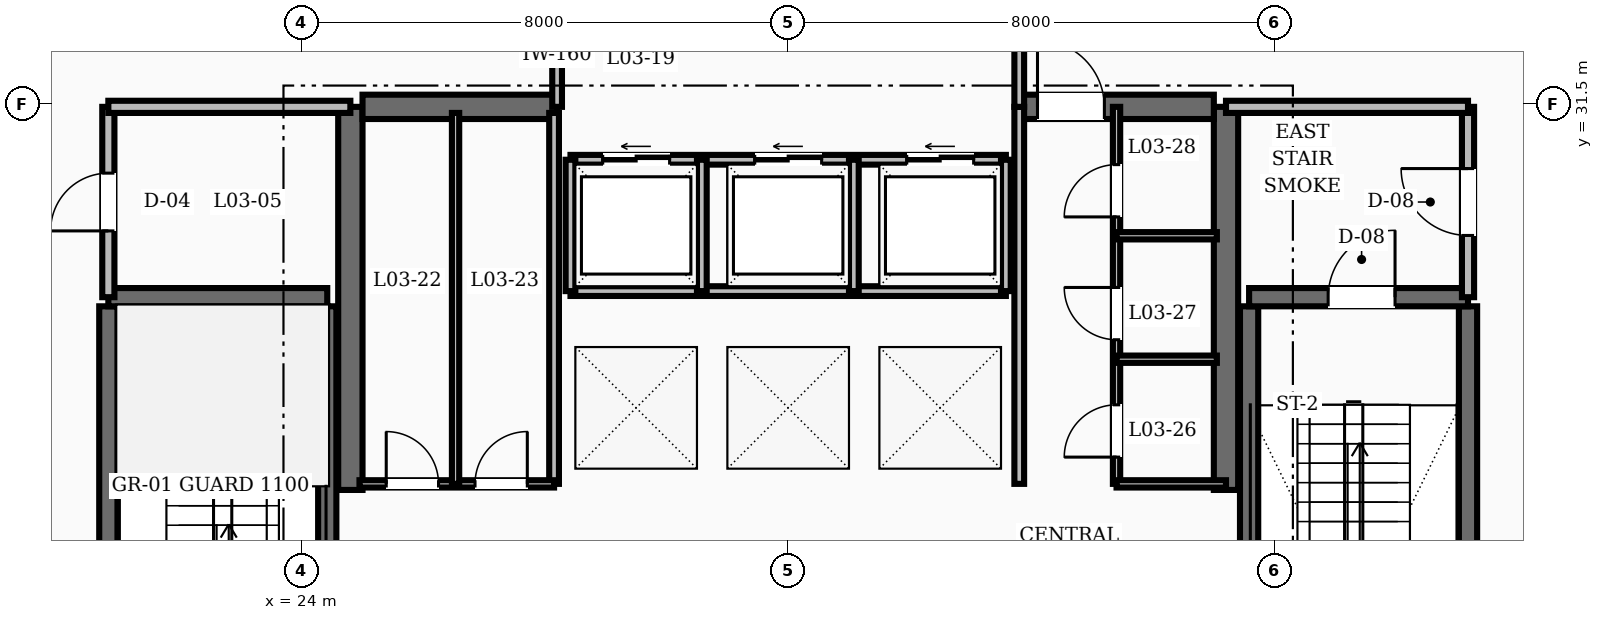
"""IFC4 building model, lengths in metres.
Left out: names, types, materials, properties, quantities, classifications, styles, units other than length and angle.
Written with IfcOpenShell. Run it as: python <this file> out.ifc"""

import sys

from ifc_helpers import new_model, si_unit, direction, frame, frame_2d, origin, place, context, subcontext, project, spatial, rectangle, extrude, element, fill, save


model = new_model("IFC4")
c1 = context("Model", 3, precision=1e-05, world=origin(), true_north=direction((0.0, 1.0)))
c2 = subcontext(c1, "Body", "Model", "MODEL_VIEW")
j1 = project(units=[si_unit("LENGTHUNIT", "METRE"), si_unit("PLANEANGLEUNIT", "RADIAN")], contexts=[c1])
p1 = place(None, origin())
s1 = spatial("IfcSite", under=j1, at=p1, CompositionType="ELEMENT")
p2 = place(p1, origin())
s2 = spatial("IfcBuilding", under=s1, at=p2, CompositionType="ELEMENT")
p3 = place(p2, frame((0.0, 0.0, 14.8)))
s3 = spatial("IfcBuildingStorey", under=s2, at=p3, CompositionType="ELEMENT", Elevation=14.8)
for number, where, z_axis, x_axis in (
    (1, (24.8, 25.15, 0.0), (0.0, 0.0, 1.0), (0.0, 1.0, 0.0)),
    (2, (39.2, 25.15, 0.0), (0.0, 0.0, 1.0), (0.0, 1.0, 0.0)),
):
    element("IfcWall", number, at=place(p3, frame(where, z_axis=z_axis, x_axis=x_axis)), inside=s3, PredefinedType="SHEAR", context=c2, shape_type="SweptSolid", body=[
        extrude(rectangle(XDim=6.3, YDim=0.4, at=frame_2d((3.15, 0.0))), origin(), (0.0, 0.0, 1.0), 4.8),
    ])
p4 = place(p3, frame((25.0, 31.45, 0.0), z_axis=(0.0, 0.0, 1.0), x_axis=(1.0, 0.0, 0.0)))
e3 = element("IfcWall", 3, at=p4, inside=s3, PredefinedType="SHEAR", context=c2, shape_type="SweptSolid", body=[
    extrude(rectangle(XDim=3.2, YDim=0.4, at=frame_2d((1.6, 0.0))), origin(), (0.0, 0.0, 1.0), 4.8),
])
p5 = place(p3, frame((35.8, 31.45, 0.0), z_axis=(0.0, 0.0, 1.0), x_axis=(1.0, 0.0, 0.0)))
e4 = element("IfcWall", 4, at=p5, inside=s3, PredefinedType="SHEAR", context=c2, shape_type="SweptSolid", body=[
    extrude(rectangle(XDim=3.2, YDim=0.4, at=frame_2d((1.6, 0.0))), origin(), (0.0, 0.0, 1.0), 4.8),
])
p6 = place(p5, frame((0.3, 0.0, 0.0)))
e5 = element("IfcOpeningElement", 5, at=p6, cuts=e4, PredefinedType="OPENING", context=c2, shape_type="SweptSolid", body=[
    extrude(rectangle(XDim=1.1, YDim=2.1, at=frame_2d((0.55, 1.05))), frame((0.0, 0.21, 0.0), z_axis=(0.0, -1.0, 0.0), x_axis=(1.0, 0.0, 0.0)), (0.0, 0.0, 1.0), 0.42),
])
for number, where, z_axis, x_axis in (
    (6, (20.82, 19.43, 0.0), (0.0, 0.0, 1.0), (0.0, 1.0, 0.0)),
    (7, (24.42, 19.43, 0.0), (0.0, 0.0, 1.0), (0.0, 1.0, 0.0)),
):
    element("IfcWall", number, at=place(p3, frame(where, z_axis=z_axis, x_axis=x_axis)), inside=s3, PredefinedType="SHEAR", context=c2, shape_type="SweptSolid", body=[
        extrude(rectangle(XDim=8.74, YDim=0.3, at=frame_2d((4.37, 0.0))), origin(), (0.0, 0.0, 1.0), 4.8),
    ])
p7 = place(p3, frame((20.82, 28.32, 0.0), z_axis=(0.0, 0.0, 1.0), x_axis=(1.0, 0.0, 0.0)))
e8 = element("IfcWall", 8, at=p7, inside=s3, PredefinedType="SHEAR", context=c2, shape_type="SweptSolid", body=[
    extrude(rectangle(XDim=3.6, YDim=0.3, at=frame_2d((1.8, 0.0))), origin(), (0.0, 0.0, 1.0), 4.8),
])
for number, where, z_axis, x_axis in (
    (9, (43.18, 19.43, 0.0), (0.0, 0.0, 1.0), (0.0, 1.0, 0.0)),
    (10, (39.58, 19.43, 0.0), (0.0, 0.0, 1.0), (0.0, 1.0, 0.0)),
):
    element("IfcWall", number, at=place(p3, frame(where, z_axis=z_axis, x_axis=x_axis)), inside=s3, PredefinedType="SHEAR", context=c2, shape_type="SweptSolid", body=[
        extrude(rectangle(XDim=8.74, YDim=0.3, at=frame_2d((4.37, 0.0))), origin(), (0.0, 0.0, 1.0), 4.8),
    ])
p8 = place(p3, frame((39.58, 28.32, 0.0), z_axis=(0.0, 0.0, 1.0), x_axis=(1.0, 0.0, 0.0)))
e11 = element("IfcWall", 11, at=p8, inside=s3, PredefinedType="SHEAR", context=c2, shape_type="SweptSolid", body=[
    extrude(rectangle(XDim=3.6, YDim=0.3, at=frame_2d((1.8, 0.0))), origin(), (0.0, 0.0, 1.0), 4.8),
])
p9 = place(p8, frame((1.3, 0.0, 0.0)))
e12 = element("IfcOpeningElement", 12, at=p9, cuts=e11, PredefinedType="OPENING", context=c2, shape_type="SweptSolid", body=[
    extrude(rectangle(XDim=1.1, YDim=2.1, at=frame_2d((0.55, 1.05))), frame((0.0, 0.16, 0.0), z_axis=(0.0, -1.0, 0.0), x_axis=(1.0, 0.0, 0.0)), (0.0, 0.0, 1.0), 0.32),
])
p10 = place(p3, frame((43.18, 28.32, 0.0), z_axis=(0.0, 0.0, 1.0), x_axis=(0.0, 1.0, 0.0)))
e13 = element("IfcWall", 13, at=p10, inside=s3, PredefinedType="SOLIDWALL", context=c2, shape_type="SweptSolid", body=[
    extrude(rectangle(XDim=3.13, YDim=0.2, at=frame_2d((1.565, 0.0))), origin(), (0.0, 0.0, 1.0), 3.52),
])
p11 = place(p10, frame((1.015, 0.0, 0.0)))
e14 = element("IfcOpeningElement", 14, at=p11, cuts=e13, PredefinedType="OPENING", context=c2, shape_type="SweptSolid", body=[
    extrude(rectangle(XDim=1.1, YDim=2.1, at=frame_2d((0.55, 1.05))), frame((0.0, 0.11, 0.0), z_axis=(0.0, -1.0, 0.0), x_axis=(1.0, 0.0, 0.0)), (0.0, 0.0, 1.0), 0.22),
])
p12 = place(p3, frame((39.2, 31.45, 0.0), z_axis=(0.0, 0.0, 1.0), x_axis=(1.0, 0.0, 0.0)))
e15 = element("IfcWall", 15, at=p12, inside=s3, PredefinedType="SOLIDWALL", context=c2, shape_type="SweptSolid", body=[
    extrude(rectangle(XDim=3.98, YDim=0.2, at=frame_2d((1.99, 0.0))), origin(), (0.0, 0.0, 1.0), 3.52),
])
p13 = place(p3, frame((20.82, 28.32, 0.0), z_axis=(0.0, 0.0, 1.0), x_axis=(0.0, 1.0, 0.0)))
e16 = element("IfcWall", 16, at=p13, inside=s3, PredefinedType="SOLIDWALL", context=c2, shape_type="SweptSolid", body=[
    extrude(rectangle(XDim=3.13, YDim=0.2, at=frame_2d((1.565, 0.0))), origin(), (0.0, 0.0, 1.0), 3.52),
])
p14 = place(p13, frame((1.09, 0.0, 0.0)))
e17 = element("IfcOpeningElement", 17, at=p14, cuts=e16, PredefinedType="OPENING", context=c2, shape_type="SweptSolid", body=[
    extrude(rectangle(XDim=0.95, YDim=2.1, at=frame_2d((0.475, 1.05))), frame((0.0, 0.11, 0.0), z_axis=(0.0, -1.0, 0.0), x_axis=(1.0, 0.0, 0.0)), (0.0, 0.0, 1.0), 0.22),
])
p15 = place(p3, frame((20.82, 31.45, 0.0), z_axis=(0.0, 0.0, 1.0), x_axis=(1.0, 0.0, 0.0)))
e18 = element("IfcWall", 18, at=p15, inside=s3, PredefinedType="SOLIDWALL", context=c2, shape_type="SweptSolid", body=[
    extrude(rectangle(XDim=3.98, YDim=0.2, at=frame_2d((1.99, 0.0))), origin(), (0.0, 0.0, 1.0), 3.52),
])
p16 = place(p3, frame((35.8, 25.25, 0.0), z_axis=(0.0, 0.0, 1.0), x_axis=(0.0, 1.0, 0.0)))
e19 = element("IfcWall", 19, at=p16, inside=s3, PredefinedType="SOLIDWALL", context=c2, shape_type="SweptSolid", body=[
    extrude(rectangle(XDim=6.2, YDim=0.16, at=frame_2d((3.1, 0.0))), origin(), (0.0, 0.0, 1.0), 3.52),
])
p17 = place(p3, frame((28.42, 30.58, 0.0), z_axis=(0.0, 0.0, 1.0), x_axis=(1.0, 0.0, 0.0)))
e20 = element("IfcWall", 20, at=p17, inside=s3, PredefinedType="SOLIDWALL", context=c2, shape_type="SweptSolid", body=[
    extrude(rectangle(XDim=7.16, YDim=0.16, at=frame_2d((3.58, 0.0))), origin(), (0.0, 0.0, 1.0), 3.52),
])
p18 = place(p17, frame((0.53, 0.0, 0.0)))
e21 = element("IfcOpeningElement", 21, at=p18, cuts=e20, PredefinedType="OPENING", context=c2, shape_type="SweptSolid", body=[
    extrude(rectangle(XDim=1.1, YDim=2.15, at=frame_2d((0.55, 1.075))), frame((0.0, 0.09, 0.0), z_axis=(0.0, -1.0, 0.0), x_axis=(1.0, 0.0, 0.0)), (0.0, 0.0, 1.0), 0.18),
])
p19 = place(p17, frame((3.03, 0.0, 0.0)))
e22 = element("IfcOpeningElement", 22, at=p19, cuts=e20, PredefinedType="OPENING", context=c2, shape_type="SweptSolid", body=[
    extrude(rectangle(XDim=1.1, YDim=2.15, at=frame_2d((0.55, 1.075))), frame((0.0, 0.09, 0.0), z_axis=(0.0, -1.0, 0.0), x_axis=(1.0, 0.0, 0.0)), (0.0, 0.0, 1.0), 0.18),
])
p20 = place(p17, frame((5.53, 0.0, 0.0)))
e23 = element("IfcOpeningElement", 23, at=p20, cuts=e20, PredefinedType="OPENING", context=c2, shape_type="SweptSolid", body=[
    extrude(rectangle(XDim=1.1, YDim=2.15, at=frame_2d((0.55, 1.075))), frame((0.0, 0.09, 0.0), z_axis=(0.0, -1.0, 0.0), x_axis=(1.0, 0.0, 0.0)), (0.0, 0.0, 1.0), 0.18),
])
p21 = place(p3, frame((28.42, 28.42, 0.0), z_axis=(0.0, 0.0, 1.0), x_axis=(1.0, 0.0, 0.0)))
e24 = element("IfcWall", 24, at=p21, inside=s3, PredefinedType="SOLIDWALL", context=c2, shape_type="SweptSolid", body=[
    extrude(rectangle(XDim=7.16, YDim=0.16, at=frame_2d((3.58, 0.0))), origin(), (0.0, 0.0, 1.0), 3.52),
])
for number, where, z_axis, x_axis in (
    (25, (28.42, 28.42, 0.0), (0.0, 0.0, 1.0), (0.0, 1.0, 0.0)),
    (26, (30.58, 28.42, 0.0), (0.0, 0.0, 1.0), (0.0, 1.0, 0.0)),
    (27, (33.08, 28.42, 0.0), (0.0, 0.0, 1.0), (0.0, 1.0, 0.0)),
    (28, (35.58, 28.42, 0.0), (0.0, 0.0, 1.0), (0.0, 1.0, 0.0)),
):
    element("IfcWall", number, at=place(p3, frame(where, z_axis=z_axis, x_axis=x_axis)), inside=s3, PredefinedType="SOLIDWALL", context=c2, shape_type="SweptSolid", body=[
        extrude(rectangle(XDim=2.16, YDim=0.16, at=frame_2d((1.08, 0.0))), origin(), (0.0, 0.0, 1.0), 3.52),
    ])
for number, where, z_axis, x_axis in (
    (29, (28.2, 31.45, 0.0), (0.0, 0.0, 1.0), (0.0, 1.0, 0.0)),
    (30, (35.8, 31.45, 0.0), (0.0, 0.0, 1.0), (0.0, 1.0, 0.0)),
):
    element("IfcWall", number, at=place(p3, frame(where, z_axis=z_axis, x_axis=x_axis)), inside=s3, PredefinedType="SOLIDWALL", context=c2, shape_type="SweptSolid", body=[
        extrude(rectangle(XDim=1.7, YDim=0.16, at=frame_2d((0.85, 0.0))), origin(), (0.0, 0.0, 1.0), 3.52),
    ])
p22 = place(p3, frame((28.15, 25.25, 0.0), z_axis=(0.0, 0.0, 1.0), x_axis=(0.0, 1.0, 0.0)))
e31 = element("IfcWall", 31, at=p22, inside=s3, PredefinedType="SOLIDWALL", context=c2, shape_type="SweptSolid", body=[
    extrude(rectangle(XDim=6.1, YDim=0.16, at=frame_2d((3.05, 0.0))), origin(), (0.0, 0.0, 1.0), 3.52),
])
p23 = place(p3, frame((24.95, 25.25, 0.0), z_axis=(0.0, 0.0, 1.0), x_axis=(1.0, 0.0, 0.0)))
e32 = element("IfcWall", 32, at=p23, inside=s3, PredefinedType="PARTITIONING", context=c2, shape_type="SweptSolid", body=[
    extrude(rectangle(XDim=3.2, YDim=0.12, at=frame_2d((1.6, 0.0))), origin(), (0.0, 0.0, 1.0), 3.52),
])
p24 = place(p23, frame((0.44, 0.0, 0.0)))
e33 = element("IfcOpeningElement", 33, at=p24, cuts=e32, PredefinedType="OPENING", context=c2, shape_type="SweptSolid", body=[
    extrude(rectangle(XDim=0.86, YDim=2.1, at=frame_2d((0.43, 1.05))), frame((0.0, 0.07, 0.0), z_axis=(0.0, -1.0, 0.0), x_axis=(1.0, 0.0, 0.0)), (0.0, 0.0, 1.0), 0.14),
])
p25 = place(p23, frame((1.9, 0.0, 0.0)))
e34 = element("IfcOpeningElement", 34, at=p25, cuts=e32, PredefinedType="OPENING", context=c2, shape_type="SweptSolid", body=[
    extrude(rectangle(XDim=0.86, YDim=2.1, at=frame_2d((0.43, 1.05))), frame((0.0, 0.07, 0.0), z_axis=(0.0, -1.0, 0.0), x_axis=(1.0, 0.0, 0.0)), (0.0, 0.0, 1.0), 0.14),
])
p26 = place(p3, frame((37.4, 25.25, 0.0), z_axis=(0.0, 0.0, 1.0), x_axis=(0.0, 1.0, 0.0)))
e35 = element("IfcWall", 35, at=p26, inside=s3, PredefinedType="PARTITIONING", context=c2, shape_type="SweptSolid", body=[
    extrude(rectangle(XDim=6.2, YDim=0.12, at=frame_2d((3.1, 0.0))), origin(), (0.0, 0.0, 1.0), 3.52),
])
p27 = place(p26, frame((0.44, 0.0, 0.0)))
e36 = element("IfcOpeningElement", 36, at=p27, cuts=e35, PredefinedType="OPENING", context=c2, shape_type="SweptSolid", body=[
    extrude(rectangle(XDim=0.86, YDim=2.1, at=frame_2d((0.43, 1.05))), frame((0.0, 0.07, 0.0), z_axis=(0.0, -1.0, 0.0), x_axis=(1.0, 0.0, 0.0)), (0.0, 0.0, 1.0), 0.14),
])
p28 = place(p26, frame((2.37, 0.0, 0.0)))
e37 = element("IfcOpeningElement", 37, at=p28, cuts=e35, PredefinedType="OPENING", context=c2, shape_type="SweptSolid", body=[
    extrude(rectangle(XDim=0.86, YDim=2.1, at=frame_2d((0.43, 1.05))), frame((0.0, 0.07, 0.0), z_axis=(0.0, -1.0, 0.0), x_axis=(1.0, 0.0, 0.0)), (0.0, 0.0, 1.0), 0.14),
])
p29 = place(p26, frame((4.39, 0.0, 0.0)))
e38 = element("IfcOpeningElement", 38, at=p29, cuts=e35, PredefinedType="OPENING", context=c2, shape_type="SweptSolid", body=[
    extrude(rectangle(XDim=0.86, YDim=2.1, at=frame_2d((0.43, 1.05))), frame((0.0, 0.07, 0.0), z_axis=(0.0, -1.0, 0.0), x_axis=(1.0, 0.0, 0.0)), (0.0, 0.0, 1.0), 0.14),
])
p30 = place(p3, frame((37.4, 25.25, 0.0), z_axis=(0.0, 0.0, 1.0), x_axis=(1.0, 0.0, 0.0)))
e39 = element("IfcWall", 39, at=p30, inside=s3, PredefinedType="PARTITIONING", context=c2, shape_type="SweptSolid", body=[
    extrude(rectangle(XDim=1.8, YDim=0.12, at=frame_2d((0.9, 0.0))), origin(), (0.0, 0.0, 1.0), 3.52),
])
p31 = place(p3, frame((26.53, 25.25, 0.0), z_axis=(0.0, 0.0, 1.0), x_axis=(0.0, 1.0, 0.0)))
e40 = element("IfcWall", 40, at=p31, inside=s3, PredefinedType="PARTITIONING", context=c2, shape_type="SweptSolid", body=[
    extrude(rectangle(XDim=6.1, YDim=0.12, at=frame_2d((3.05, 0.0))), origin(), (0.0, 0.0, 1.0), 3.52),
])
for number, where, z_axis, x_axis in (
    (41, (37.4, 27.3, 0.0), (0.0, 0.0, 1.0), (1.0, 0.0, 0.0)),
    (42, (37.4, 29.33, 0.0), (0.0, 0.0, 1.0), (1.0, 0.0, 0.0)),
):
    element("IfcWall", number, at=place(p3, frame(where, z_axis=z_axis, x_axis=x_axis)), inside=s3, PredefinedType="PARTITIONING", context=c2, shape_type="SweptSolid", body=[
        extrude(rectangle(XDim=1.65, YDim=0.12, at=frame_2d((0.825, 0.0))), origin(), (0.0, 0.0, 1.0), 3.52),
    ])
p32 = place(p9, origin())
e43 = element("IfcDoor", 43, at=p32, inside=s3, OperationType="SINGLE_SWING_RIGHT", PredefinedType="DOOR", context=c2, shape_type="SweptSolid", body=[
    extrude(rectangle(XDim=1.1, YDim=2.1, at=frame_2d((0.55, 1.05))), frame((0.0, 0.025, 0.0), z_axis=(0.0, -1.0, 0.0), x_axis=(1.0, 0.0, 0.0)), (0.0, 0.0, 1.0), 0.05),
])
fill(e12, e43)
p33 = place(p11, origin())
e44 = element("IfcDoor", 44, at=p33, inside=s3, OperationType="SINGLE_SWING_RIGHT", PredefinedType="DOOR", context=c2, shape_type="SweptSolid", body=[
    extrude(rectangle(XDim=1.1, YDim=2.1, at=frame_2d((0.55, 1.05))), frame((0.0, 0.025, 0.0), z_axis=(0.0, -1.0, 0.0), x_axis=(1.0, 0.0, 0.0)), (0.0, 0.0, 1.0), 0.05),
])
fill(e14, e44)
p34 = place(p14, origin())
e45 = element("IfcDoor", 45, at=p34, inside=s3, OperationType="SINGLE_SWING_LEFT", PredefinedType="DOOR", context=c2, shape_type="SweptSolid", body=[
    extrude(rectangle(XDim=0.95, YDim=2.1, at=frame_2d((0.475, 1.05))), frame((0.0, 0.025, 0.0), z_axis=(0.0, -1.0, 0.0), x_axis=(1.0, 0.0, 0.0)), (0.0, 0.0, 1.0), 0.05),
])
fill(e17, e45)
p35 = place(p6, origin())
e46 = element("IfcDoor", 46, at=p35, inside=s3, OperationType="SINGLE_SWING_LEFT", PredefinedType="DOOR", context=c2, shape_type="SweptSolid", body=[
    extrude(rectangle(XDim=1.1, YDim=2.1, at=frame_2d((0.55, 1.05))), frame((0.0, 0.025, 0.0), z_axis=(0.0, -1.0, 0.0), x_axis=(1.0, 0.0, 0.0)), (0.0, 0.0, 1.0), 0.05),
])
fill(e5, e46)
p36 = place(p18, origin())
e47 = element("IfcDoor", 47, at=p36, inside=s3, OperationType="SLIDING_TO_LEFT", PredefinedType="DOOR", context=c2, shape_type="SweptSolid", body=[
    extrude(rectangle(XDim=1.1, YDim=2.15, at=frame_2d((0.55, 1.075))), frame((0.0, 0.025, 0.0), z_axis=(0.0, -1.0, 0.0), x_axis=(1.0, 0.0, 0.0)), (0.0, 0.0, 1.0), 0.05),
])
fill(e21, e47)
p37 = place(p19, origin())
e48 = element("IfcDoor", 48, at=p37, inside=s3, OperationType="SLIDING_TO_LEFT", PredefinedType="DOOR", context=c2, shape_type="SweptSolid", body=[
    extrude(rectangle(XDim=1.1, YDim=2.15, at=frame_2d((0.55, 1.075))), frame((0.0, 0.025, 0.0), z_axis=(0.0, -1.0, 0.0), x_axis=(1.0, 0.0, 0.0)), (0.0, 0.0, 1.0), 0.05),
])
fill(e22, e48)
p38 = place(p20, origin())
e49 = element("IfcDoor", 49, at=p38, inside=s3, OperationType="SLIDING_TO_LEFT", PredefinedType="DOOR", context=c2, shape_type="SweptSolid", body=[
    extrude(rectangle(XDim=1.1, YDim=2.15, at=frame_2d((0.55, 1.075))), frame((0.0, 0.025, 0.0), z_axis=(0.0, -1.0, 0.0), x_axis=(1.0, 0.0, 0.0)), (0.0, 0.0, 1.0), 0.05),
])
fill(e23, e49)
p39 = place(p24, origin())
e50 = element("IfcDoor", 50, at=p39, inside=s3, OperationType="SINGLE_SWING_LEFT", PredefinedType="DOOR", context=c2, shape_type="SweptSolid", body=[
    extrude(rectangle(XDim=0.86, YDim=2.1, at=frame_2d((0.43, 1.05))), frame((0.0, 0.025, 0.0), z_axis=(0.0, -1.0, 0.0), x_axis=(1.0, 0.0, 0.0)), (0.0, 0.0, 1.0), 0.05),
])
fill(e33, e50)
p40 = place(p25, origin())
e51 = element("IfcDoor", 51, at=p40, inside=s3, OperationType="SINGLE_SWING_RIGHT", PredefinedType="DOOR", context=c2, shape_type="SweptSolid", body=[
    extrude(rectangle(XDim=0.86, YDim=2.1, at=frame_2d((0.43, 1.05))), frame((0.0, 0.025, 0.0), z_axis=(0.0, -1.0, 0.0), x_axis=(1.0, 0.0, 0.0)), (0.0, 0.0, 1.0), 0.05),
])
fill(e34, e51)
p41 = place(p27, origin())
e52 = element("IfcDoor", 52, at=p41, inside=s3, OperationType="SINGLE_SWING_LEFT", PredefinedType="DOOR", context=c2, shape_type="SweptSolid", body=[
    extrude(rectangle(XDim=0.86, YDim=2.1, at=frame_2d((0.43, 1.05))), frame((0.0, 0.025, 0.0), z_axis=(0.0, -1.0, 0.0), x_axis=(1.0, 0.0, 0.0)), (0.0, 0.0, 1.0), 0.05),
])
fill(e36, e52)
p42 = place(p28, origin())
e53 = element("IfcDoor", 53, at=p42, inside=s3, OperationType="SINGLE_SWING_RIGHT", PredefinedType="DOOR", context=c2, shape_type="SweptSolid", body=[
    extrude(rectangle(XDim=0.86, YDim=2.1, at=frame_2d((0.43, 1.05))), frame((0.0, 0.025, 0.0), z_axis=(0.0, -1.0, 0.0), x_axis=(1.0, 0.0, 0.0)), (0.0, 0.0, 1.0), 0.05),
])
fill(e37, e53)
p43 = place(p29, origin())
e54 = element("IfcDoor", 54, at=p43, inside=s3, OperationType="SINGLE_SWING_LEFT", PredefinedType="DOOR", context=c2, shape_type="SweptSolid", body=[
    extrude(rectangle(XDim=0.86, YDim=2.1, at=frame_2d((0.43, 1.05))), frame((0.0, 0.025, 0.0), z_axis=(0.0, -1.0, 0.0), x_axis=(1.0, 0.0, 0.0)), (0.0, 0.0, 1.0), 0.05),
])
fill(e38, e54)
save(model, sys.argv[1])
